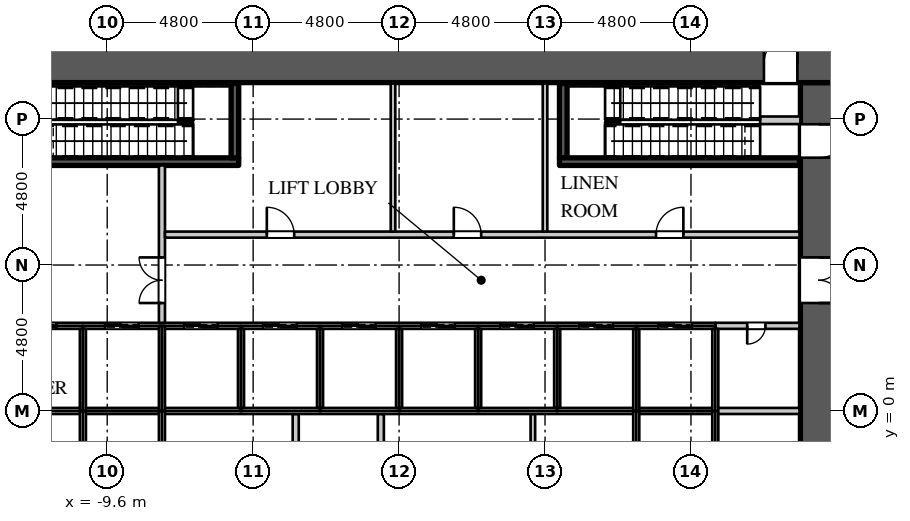
"""IFC4 building model, lengths in metres.
Left out: names, types, materials, properties, quantities, classifications, styles, units other than length and angle.
Written with IfcOpenShell. Run it as: python <this file> out.ifc"""

import sys

from ifc_helpers import new_model, si_unit, direction, frame, frame_2d, origin, place, context, subcontext, project, spatial, rectangle, extrude, element, fill, save


model = new_model("IFC4")
c1 = context("Model", 3, precision=1e-05, world=origin(), true_north=direction((0.0, 1.0)))
c2 = subcontext(c1, "Body", "Model", "MODEL_VIEW")
j1 = project(units=[si_unit("LENGTHUNIT", "METRE"), si_unit("PLANEANGLEUNIT", "RADIAN")], contexts=[c1])
p1 = place(None, origin())
s1 = spatial("IfcSite", under=j1, at=p1, CompositionType="ELEMENT")
p2 = place(p1, origin())
s2 = spatial("IfcBuilding", under=s1, at=p2, CompositionType="ELEMENT")
p3 = place(p2, origin())
s3 = spatial("IfcBuildingStorey", under=s2, at=p3, CompositionType="ELEMENT", Elevation=0.0)
p4 = place(p3, frame((-14.4, 11.4, 0.0), z_axis=(0.0, 0.0, 1.0), x_axis=(1.0, 0.0, 0.0)))
e1 = element("IfcWall", 1, at=p4, inside=s3, PredefinedType="SHEAR", context=c2, shape_type="SweptSolid", body=[
    extrude(rectangle(XDim=28.8, YDim=1.2, at=frame_2d((14.4, 0.0))), origin(), (0.0, 0.0, 1.0), 6.0),
])
p5 = place(p4, frame((1.3, 0.0, 0.0)))
e2 = element("IfcOpeningElement", 2, at=p5, cuts=e1, PredefinedType="OPENING", context=c2, shape_type="SweptSolid", body=[
    extrude(rectangle(XDim=1.1, YDim=2.2, at=frame_2d((0.55, 1.1))), frame((0.0, 0.61, 0.0), z_axis=(0.0, -1.0, 0.0), x_axis=(1.0, 0.0, 0.0)), (0.0, 0.0, 1.0), 1.22),
])
p6 = place(p4, frame((26.4, 0.0, 0.0)))
e3 = element("IfcOpeningElement", 3, at=p6, cuts=e1, PredefinedType="OPENING", context=c2, shape_type="SweptSolid", body=[
    extrude(rectangle(XDim=1.1, YDim=2.2, at=frame_2d((0.55, 1.1))), frame((0.0, 0.61, 0.0), z_axis=(0.0, -1.0, 0.0), x_axis=(1.0, 0.0, 0.0)), (0.0, 0.0, 1.0), 1.22),
])
p7 = place(p3, frame((13.8, -10.8, 0.0), z_axis=(0.0, 0.0, 1.0), x_axis=(0.0, 1.0, 0.0)))
e4 = element("IfcWall", 4, at=p7, inside=s3, PredefinedType="SHEAR", context=c2, shape_type="SweptSolid", body=[
    extrude(rectangle(XDim=21.6, YDim=1.2, at=frame_2d((10.8, 0.0))), origin(), (0.0, 0.0, 1.0), 6.0),
])
p8 = place(p7, frame((14.35, 0.0, 0.0)))
e5 = element("IfcOpeningElement", 5, at=p8, cuts=e4, PredefinedType="OPENING", context=c2, shape_type="SweptSolid", body=[
    extrude(rectangle(XDim=1.5, YDim=2.4, at=frame_2d((0.75, 1.2))), frame((0.0, 0.61, 0.0), z_axis=(0.0, -1.0, 0.0), x_axis=(1.0, 0.0, 0.0)), (0.0, 0.0, 1.0), 1.22),
])
p9 = place(p7, frame((5.75, 0.0, 0.0)))
e6 = element("IfcOpeningElement", 6, at=p9, cuts=e4, PredefinedType="OPENING", context=c2, shape_type="SweptSolid", body=[
    extrude(rectangle(XDim=1.5, YDim=2.4, at=frame_2d((0.75, 1.2))), frame((0.0, 0.61, 0.0), z_axis=(0.0, -1.0, 0.0), x_axis=(1.0, 0.0, 0.0)), (0.0, 0.0, 1.0), 1.22),
])
p10 = place(p7, frame((19.13, 0.0, 0.0)))
e7 = element("IfcOpeningElement", 7, at=p10, cuts=e4, PredefinedType="OPENING", context=c2, shape_type="SweptSolid", body=[
    extrude(rectangle(XDim=1.1, YDim=2.2, at=frame_2d((0.55, 1.1))), frame((0.0, 0.61, 0.0), z_axis=(0.0, -1.0, 0.0), x_axis=(1.0, 0.0, 0.0)), (0.0, 0.0, 1.0), 1.22),
])
p11 = place(p7, frame((1.37, 0.0, 0.0)))
e8 = element("IfcOpeningElement", 8, at=p11, cuts=e4, PredefinedType="OPENING", context=c2, shape_type="SweptSolid", body=[
    extrude(rectangle(XDim=1.1, YDim=2.2, at=frame_2d((0.55, 1.1))), frame((0.0, 0.61, 0.0), z_axis=(0.0, -1.0, 0.0), x_axis=(1.0, 0.0, 0.0)), (0.0, 0.0, 1.0), 1.22),
])
p12 = place(p3, frame((-7.8, 2.8, 0.0), z_axis=(0.0, 0.0, 1.0), x_axis=(0.0, 1.0, 0.0)))
e9 = element("IfcWall", 9, at=p12, inside=s3, PredefinedType="PARTITIONING", context=c2, shape_type="SweptSolid", body=[
    extrude(rectangle(XDim=5.275, YDim=0.2, at=frame_2d((2.637, 0.0))), origin(), (0.0, 0.0, 1.0), 5.65),
])
p13 = place(p12, frame((0.75, 0.0, 0.0)))
e10 = element("IfcOpeningElement", 10, at=p13, cuts=e9, PredefinedType="OPENING", context=c2, shape_type="SweptSolid", body=[
    extrude(rectangle(XDim=1.5, YDim=2.4, at=frame_2d((0.75, 1.2))), frame((0.0, 0.11, 0.0), z_axis=(0.0, -1.0, 0.0), x_axis=(1.0, 0.0, 0.0)), (0.0, 0.0, 1.0), 0.22),
])
p14 = place(p3, frame((-7.7, 5.8, 0.0), z_axis=(0.0, 0.0, 1.0), x_axis=(1.0, 0.0, 0.0)))
e11 = element("IfcWall", 11, at=p14, inside=s3, PredefinedType="PARTITIONING", context=c2, shape_type="SweptSolid", body=[
    extrude(rectangle(XDim=20.87, YDim=0.2, at=frame_2d((10.435, 0.0))), origin(), (0.0, 0.0, 1.0), 5.65),
])
p15 = place(p14, frame((3.35, 0.0, 0.0)))
e12 = element("IfcOpeningElement", 12, at=p15, cuts=e11, PredefinedType="OPENING", context=c2, shape_type="SweptSolid", body=[
    extrude(rectangle(XDim=0.9, YDim=2.2, at=frame_2d((0.45, 1.1))), frame((0.0, 0.11, 0.0), z_axis=(0.0, -1.0, 0.0), x_axis=(1.0, 0.0, 0.0)), (0.0, 0.0, 1.0), 0.22),
])
p16 = place(p14, frame((9.5, 0.0, 0.0)))
e13 = element("IfcOpeningElement", 13, at=p16, cuts=e11, PredefinedType="OPENING", context=c2, shape_type="SweptSolid", body=[
    extrude(rectangle(XDim=0.9, YDim=2.2, at=frame_2d((0.45, 1.1))), frame((0.0, 0.11, 0.0), z_axis=(0.0, -1.0, 0.0), x_axis=(1.0, 0.0, 0.0)), (0.0, 0.0, 1.0), 0.22),
])
p17 = place(p14, frame((16.15, 0.0, 0.0)))
e14 = element("IfcOpeningElement", 14, at=p17, cuts=e11, PredefinedType="OPENING", context=c2, shape_type="SweptSolid", body=[
    extrude(rectangle(XDim=0.9, YDim=2.2, at=frame_2d((0.45, 1.1))), frame((0.0, 0.11, 0.0), z_axis=(0.0, -1.0, 0.0), x_axis=(1.0, 0.0, 0.0)), (0.0, 0.0, 1.0), 0.22),
])
p18 = place(p3, frame((-0.2, 5.9, 0.0), z_axis=(0.0, 0.0, 1.0), x_axis=(0.0, 1.0, 0.0)))
e15 = element("IfcWall", 15, at=p18, inside=s3, PredefinedType="PARTITIONING", context=c2, shape_type="SweptSolid", body=[
    extrude(rectangle(XDim=4.87, YDim=0.15, at=frame_2d((2.435, 0.0))), origin(), (0.0, 0.0, 1.0), 5.65),
])
p19 = place(p3, frame((4.4, -2.7, 0.0), z_axis=(0.0, 0.0, 1.0), x_axis=(0.0, 1.0, 0.0)))
e16 = element("IfcWall", 16, at=p19, inside=s3, PredefinedType="PARTITIONING", context=c2, shape_type="SweptSolid", body=[
    extrude(rectangle(XDim=2.6, YDim=0.15, at=frame_2d((1.3, 0.0))), origin(), (0.0, 0.0, 1.0), 5.65),
])
p20 = place(p3, frame((4.8, 5.9, 0.0), z_axis=(0.0, 0.0, 1.0), x_axis=(0.0, 1.0, 0.0)))
e17 = element("IfcWall", 17, at=p20, inside=s3, PredefinedType="PARTITIONING", context=c2, shape_type="SweptSolid", body=[
    extrude(rectangle(XDim=4.87, YDim=0.15, at=frame_2d((2.435, 0.0))), origin(), (0.0, 0.0, 1.0), 5.65),
])
for number, where, z_axis, x_axis in (
    (18, (-3.4, -2.7, 0.0), (0.0, 0.0, 1.0), (0.0, 1.0, 0.0)),
    (19, (-0.6, -2.7, 0.0), (0.0, 0.0, 1.0), (0.0, 1.0, 0.0)),
):
    element("IfcWall", number, at=place(p3, frame(where, z_axis=z_axis, x_axis=x_axis)), inside=s3, PredefinedType="PARTITIONING", context=c2, shape_type="SweptSolid", body=[
        extrude(rectangle(XDim=2.6, YDim=0.2, at=frame_2d((1.3, 0.0))), origin(), (0.0, 0.0, 1.0), 5.65),
    ])
p21 = place(p3, frame((10.4, 2.8, 0.0), z_axis=(0.0, 0.0, 1.0), x_axis=(1.0, 0.0, 0.0)))
e20 = element("IfcWall", 20, at=p21, inside=s3, PredefinedType="PARTITIONING", context=c2, shape_type="SweptSolid", body=[
    extrude(rectangle(XDim=2.77, YDim=0.2, at=frame_2d((1.385, 0.0))), origin(), (0.0, 0.0, 1.0), 5.65),
])
p22 = place(p21, frame((1.05, 0.0, 0.0)))
e21 = element("IfcOpeningElement", 21, at=p22, cuts=e20, PredefinedType="OPENING", context=c2, shape_type="SweptSolid", body=[
    extrude(rectangle(XDim=0.6, YDim=2.0, at=frame_2d((0.3, 1.0))), frame((0.0, 0.11, 0.0), z_axis=(0.0, -1.0, 0.0), x_axis=(1.0, 0.0, 0.0)), (0.0, 0.0, 1.0), 0.22),
])
p23 = place(p3, frame((10.4, 0.0, 0.0), z_axis=(0.0, 0.0, 1.0), x_axis=(1.0, 0.0, 0.0)))
e22 = element("IfcWall", 22, at=p23, inside=s3, PredefinedType="PARTITIONING", context=c2, shape_type="SweptSolid", body=[
    extrude(rectangle(XDim=2.77, YDim=0.2, at=frame_2d((1.385, 0.0))), origin(), (0.0, 0.0, 1.0), 5.65),
])
p24 = place(p3, frame((-13.17, 0.0, 0.0), z_axis=(0.0, 0.0, 1.0), x_axis=(1.0, 0.0, 0.0)))
e23 = element("IfcWall", 23, at=p24, inside=s3, PredefinedType="PARTITIONING", context=c2, shape_type="SweptSolid", body=[
    extrude(rectangle(XDim=23.57, YDim=0.2, at=frame_2d((11.785, 0.0))), origin(), (0.0, 0.0, 1.0), 5.65),
])
p25 = place(p3, frame((-13.17, 2.8, 0.0), z_axis=(0.0, 0.0, 1.0), x_axis=(1.0, 0.0, 0.0)))
e24 = element("IfcWall", 24, at=p25, inside=s3, PredefinedType="PARTITIONING", context=c2, shape_type="SweptSolid", body=[
    extrude(rectangle(XDim=23.57, YDim=0.2, at=frame_2d((11.785, 0.0))), origin(), (0.0, 0.0, 1.0), 5.65),
])
p26 = place(p25, frame((0.8, 0.0, 0.0)))
e25 = element("IfcOpeningElement", 25, at=p26, cuts=e24, PredefinedType="OPENING", context=c2, shape_type="SweptSolid", body=[
    extrude(rectangle(XDim=1.1, YDim=2.2, at=frame_2d((0.55, 1.1))), frame((0.0, 0.11, 0.0), z_axis=(0.0, -1.0, 0.0), x_axis=(1.0, 0.0, 0.0)), (0.0, 0.0, 1.0), 0.22),
])
p27 = place(p25, frame((3.5, 0.0, 0.0)))
e26 = element("IfcOpeningElement", 26, at=p27, cuts=e24, PredefinedType="OPENING", context=c2, shape_type="SweptSolid", body=[
    extrude(rectangle(XDim=1.1, YDim=2.2, at=frame_2d((0.55, 1.1))), frame((0.0, 0.11, 0.0), z_axis=(0.0, -1.0, 0.0), x_axis=(1.0, 0.0, 0.0)), (0.0, 0.0, 1.0), 0.22),
])
p28 = place(p25, frame((6.1, 0.0, 0.0)))
e27 = element("IfcOpeningElement", 27, at=p28, cuts=e24, PredefinedType="OPENING", context=c2, shape_type="SweptSolid", body=[
    extrude(rectangle(XDim=1.1, YDim=2.2, at=frame_2d((0.55, 1.1))), frame((0.0, 0.11, 0.0), z_axis=(0.0, -1.0, 0.0), x_axis=(1.0, 0.0, 0.0)), (0.0, 0.0, 1.0), 0.22),
])
p29 = place(p25, frame((8.7, 0.0, 0.0)))
e28 = element("IfcOpeningElement", 28, at=p29, cuts=e24, PredefinedType="OPENING", context=c2, shape_type="SweptSolid", body=[
    extrude(rectangle(XDim=1.1, YDim=2.2, at=frame_2d((0.55, 1.1))), frame((0.0, 0.11, 0.0), z_axis=(0.0, -1.0, 0.0), x_axis=(1.0, 0.0, 0.0)), (0.0, 0.0, 1.0), 0.22),
])
p30 = place(p25, frame((11.3, 0.0, 0.0)))
e29 = element("IfcOpeningElement", 29, at=p30, cuts=e24, PredefinedType="OPENING", context=c2, shape_type="SweptSolid", body=[
    extrude(rectangle(XDim=1.1, YDim=2.2, at=frame_2d((0.55, 1.1))), frame((0.0, 0.11, 0.0), z_axis=(0.0, -1.0, 0.0), x_axis=(1.0, 0.0, 0.0)), (0.0, 0.0, 1.0), 0.22),
])
p31 = place(p25, frame((13.9, 0.0, 0.0)))
e30 = element("IfcOpeningElement", 30, at=p31, cuts=e24, PredefinedType="OPENING", context=c2, shape_type="SweptSolid", body=[
    extrude(rectangle(XDim=1.1, YDim=2.2, at=frame_2d((0.55, 1.1))), frame((0.0, 0.11, 0.0), z_axis=(0.0, -1.0, 0.0), x_axis=(1.0, 0.0, 0.0)), (0.0, 0.0, 1.0), 0.22),
])
p32 = place(p25, frame((16.5, 0.0, 0.0)))
e31 = element("IfcOpeningElement", 31, at=p32, cuts=e24, PredefinedType="OPENING", context=c2, shape_type="SweptSolid", body=[
    extrude(rectangle(XDim=1.1, YDim=2.2, at=frame_2d((0.55, 1.1))), frame((0.0, 0.11, 0.0), z_axis=(0.0, -1.0, 0.0), x_axis=(1.0, 0.0, 0.0)), (0.0, 0.0, 1.0), 0.22),
])
p33 = place(p25, frame((19.1, 0.0, 0.0)))
e32 = element("IfcOpeningElement", 32, at=p33, cuts=e24, PredefinedType="OPENING", context=c2, shape_type="SweptSolid", body=[
    extrude(rectangle(XDim=1.1, YDim=2.2, at=frame_2d((0.55, 1.1))), frame((0.0, 0.11, 0.0), z_axis=(0.0, -1.0, 0.0), x_axis=(1.0, 0.0, 0.0)), (0.0, 0.0, 1.0), 0.22),
])
p34 = place(p25, frame((21.7, 0.0, 0.0)))
e33 = element("IfcOpeningElement", 33, at=p34, cuts=e24, PredefinedType="OPENING", context=c2, shape_type="SweptSolid", body=[
    extrude(rectangle(XDim=1.1, YDim=2.2, at=frame_2d((0.55, 1.1))), frame((0.0, 0.11, 0.0), z_axis=(0.0, -1.0, 0.0), x_axis=(1.0, 0.0, 0.0)), (0.0, 0.0, 1.0), 0.22),
])
for number, where, z_axis, x_axis in (
    (34, (-10.4, -2.7, 0.0), (0.0, 0.0, 1.0), (0.0, 1.0, 0.0)),
    (35, (-10.4, 0.0, 0.0), (0.0, 0.0, 1.0), (0.0, 1.0, 0.0)),
):
    element("IfcWall", number, at=place(p3, frame(where, z_axis=z_axis, x_axis=x_axis)), inside=s3, PredefinedType="PARTITIONING", context=c2, shape_type="SweptSolid", body=[
        extrude(rectangle(XDim=2.7, YDim=0.2, at=frame_2d((1.35, 0.0))), origin(), (0.0, 0.0, 1.0), 5.65),
    ])
for number, where, z_axis, x_axis in (
    (36, (-7.8, -2.8, 0.0), (0.0, 0.0, 1.0), (0.0, 1.0, 0.0)),
    (37, (-7.8, 0.0, 0.0), (0.0, 0.0, 1.0), (0.0, 1.0, 0.0)),
):
    element("IfcWall", number, at=place(p3, frame(where, z_axis=z_axis, x_axis=x_axis)), inside=s3, PredefinedType="PARTITIONING", context=c2, shape_type="SweptSolid", body=[
        extrude(rectangle(XDim=2.8, YDim=0.2, at=frame_2d((1.4, 0.0))), origin(), (0.0, 0.0, 1.0), 5.65),
    ])
for number, where, z_axis, x_axis in (
    (38, (-5.2, 0.1, 0.0), (0.0, 0.0, 1.0), (0.0, 1.0, 0.0)),
    (39, (-2.6, 0.1, 0.0), (0.0, 0.0, 1.0), (0.0, 1.0, 0.0)),
    (40, (0.0, 0.1, 0.0), (0.0, 0.0, 1.0), (0.0, 1.0, 0.0)),
    (41, (2.6, 0.1, 0.0), (0.0, 0.0, 1.0), (0.0, 1.0, 0.0)),
    (42, (5.2, 0.1, 0.0), (0.0, 0.0, 1.0), (0.0, 1.0, 0.0)),
):
    element("IfcWall", number, at=place(p3, frame(where, z_axis=z_axis, x_axis=x_axis)), inside=s3, PredefinedType="PARTITIONING", context=c2, shape_type="SweptSolid", body=[
        extrude(rectangle(XDim=2.6, YDim=0.2, at=frame_2d((1.3, 0.0))), origin(), (0.0, 0.0, 1.0), 5.65),
    ])
for number, where, z_axis, x_axis in (
    (43, (7.8, -2.7, 0.0), (0.0, 0.0, 1.0), (0.0, 1.0, 0.0)),
    (44, (7.8, 0.0, 0.0), (0.0, 0.0, 1.0), (0.0, 1.0, 0.0)),
):
    element("IfcWall", number, at=place(p3, frame(where, z_axis=z_axis, x_axis=x_axis)), inside=s3, PredefinedType="PARTITIONING", context=c2, shape_type="SweptSolid", body=[
        extrude(rectangle(XDim=2.7, YDim=0.2, at=frame_2d((1.35, 0.0))), origin(), (0.0, 0.0, 1.0), 5.65),
    ])
p35 = place(p3, frame((10.4, -2.7, 0.0), z_axis=(0.0, 0.0, 1.0), x_axis=(0.0, 1.0, 0.0)))
e45 = element("IfcWall", 45, at=p35, inside=s3, PredefinedType="PARTITIONING", context=c2, shape_type="SweptSolid", body=[
    extrude(rectangle(XDim=5.4, YDim=0.2, at=frame_2d((2.7, 0.0))), origin(), (0.0, 0.0, 1.0), 5.65),
])
p36 = place(p3, frame((-13.17, 8.2, 0.0), z_axis=(0.0, 0.0, 1.0), x_axis=(1.0, 0.0, 0.0)))
e46 = element("IfcWall", 46, at=p36, inside=s3, PredefinedType="SHEAR", context=c2, shape_type="SweptSolid", body=[
    extrude(rectangle(XDim=7.895, YDim=0.25, at=frame_2d((3.948, 0.0))), origin(), (0.0, 0.0, 1.0), 5.65),
])
p37 = place(p36, frame((0.15, 0.0, 0.0)))
e47 = element("IfcOpeningElement", 47, at=p37, cuts=e46, PredefinedType="OPENING", context=c2, shape_type="SweptSolid", body=[
    extrude(rectangle(XDim=1.1, YDim=2.2, at=frame_2d((0.55, 1.1))), frame((0.0, 0.135, 0.0), z_axis=(0.0, -1.0, 0.0), x_axis=(1.0, 0.0, 0.0)), (0.0, 0.0, 1.0), 0.27),
])
for number, where, z_axis, x_axis in (
    (48, (-5.4, 8.325, 0.0), (0.0, 0.0, 1.0), (0.0, 1.0, 0.0)),
    (49, (5.4, 8.325, 0.0), (0.0, 0.0, 1.0), (0.0, 1.0, 0.0)),
):
    element("IfcWall", number, at=place(p3, frame(where, z_axis=z_axis, x_axis=x_axis)), inside=s3, PredefinedType="SHEAR", context=c2, shape_type="SweptSolid", body=[
        extrude(rectangle(XDim=2.445, YDim=0.25, at=frame_2d((1.223, 0.0))), origin(), (0.0, 0.0, 1.0), 5.65),
    ])
p38 = place(p3, frame((5.275, 8.2, 0.0), z_axis=(0.0, 0.0, 1.0), x_axis=(1.0, 0.0, 0.0)))
e50 = element("IfcWall", 50, at=p38, inside=s3, PredefinedType="SHEAR", context=c2, shape_type="SweptSolid", body=[
    extrude(rectangle(XDim=7.895, YDim=0.25, at=frame_2d((3.948, 0.0))), origin(), (0.0, 0.0, 1.0), 5.65),
])
p39 = place(p3, frame((13.2, 9.56, 0.0), z_axis=(0.0, 0.0, 1.0), x_axis=(-1.0, 0.0, 0.0)))
e51 = element("IfcWall", 51, at=p39, inside=s3, PredefinedType="PARTITIONING", context=c2, shape_type="SweptSolid", body=[
    extrude(rectangle(XDim=1.325, YDim=0.25, at=frame_2d((0.663, 0.0))), origin(), (0.0, 0.0, 1.0), 5.65),
])
p40 = place(p22, origin())
e52 = element("IfcDoor", 52, at=p40, inside=s3, OperationType="SINGLE_SWING_RIGHT", PredefinedType="DOOR", context=c2, shape_type="SweptSolid", body=[
    extrude(rectangle(XDim=0.6, YDim=2.0, at=frame_2d((0.3, 1.0))), frame((0.0, 0.025, 0.0), z_axis=(0.0, -1.0, 0.0), x_axis=(1.0, 0.0, 0.0)), (0.0, 0.0, 1.0), 0.05),
])
fill(e21, e52)
p41 = place(p15, origin())
e53 = element("IfcDoor", 53, at=p41, inside=s3, OperationType="SINGLE_SWING_LEFT", PredefinedType="DOOR", context=c2, shape_type="SweptSolid", body=[
    extrude(rectangle(XDim=0.9, YDim=2.2, at=frame_2d((0.45, 1.1))), frame((0.0, 0.025, 0.0), z_axis=(0.0, -1.0, 0.0), x_axis=(1.0, 0.0, 0.0)), (0.0, 0.0, 1.0), 0.05),
])
fill(e12, e53)
p42 = place(p16, origin())
e54 = element("IfcDoor", 54, at=p42, inside=s3, OperationType="SINGLE_SWING_LEFT", PredefinedType="DOOR", context=c2, shape_type="SweptSolid", body=[
    extrude(rectangle(XDim=0.9, YDim=2.2, at=frame_2d((0.45, 1.1))), frame((0.0, 0.025, 0.0), z_axis=(0.0, -1.0, 0.0), x_axis=(1.0, 0.0, 0.0)), (0.0, 0.0, 1.0), 0.05),
])
fill(e13, e54)
p43 = place(p17, origin())
e55 = element("IfcDoor", 55, at=p43, inside=s3, OperationType="SINGLE_SWING_RIGHT", PredefinedType="DOOR", context=c2, shape_type="SweptSolid", body=[
    extrude(rectangle(XDim=0.9, YDim=2.2, at=frame_2d((0.45, 1.1))), frame((0.0, 0.025, 0.0), z_axis=(0.0, -1.0, 0.0), x_axis=(1.0, 0.0, 0.0)), (0.0, 0.0, 1.0), 0.05),
])
fill(e14, e55)
p44 = place(p26, origin())
e56 = element("IfcDoor", 56, at=p44, inside=s3, OperationType="DOUBLE_DOOR_SLIDING", PredefinedType="DOOR", context=c2, shape_type="SweptSolid", body=[
    extrude(rectangle(XDim=1.1, YDim=2.2, at=frame_2d((0.55, 1.1))), frame((0.0, 0.025, 0.0), z_axis=(0.0, -1.0, 0.0), x_axis=(1.0, 0.0, 0.0)), (0.0, 0.0, 1.0), 0.05),
])
fill(e25, e56)
p45 = place(p27, origin())
e57 = element("IfcDoor", 57, at=p45, inside=s3, OperationType="DOUBLE_DOOR_SLIDING", PredefinedType="DOOR", context=c2, shape_type="SweptSolid", body=[
    extrude(rectangle(XDim=1.1, YDim=2.2, at=frame_2d((0.55, 1.1))), frame((0.0, 0.025, 0.0), z_axis=(0.0, -1.0, 0.0), x_axis=(1.0, 0.0, 0.0)), (0.0, 0.0, 1.0), 0.05),
])
fill(e26, e57)
p46 = place(p28, origin())
e58 = element("IfcDoor", 58, at=p46, inside=s3, OperationType="DOUBLE_DOOR_SLIDING", PredefinedType="DOOR", context=c2, shape_type="SweptSolid", body=[
    extrude(rectangle(XDim=1.1, YDim=2.2, at=frame_2d((0.55, 1.1))), frame((0.0, 0.025, 0.0), z_axis=(0.0, -1.0, 0.0), x_axis=(1.0, 0.0, 0.0)), (0.0, 0.0, 1.0), 0.05),
])
fill(e27, e58)
p47 = place(p29, origin())
e59 = element("IfcDoor", 59, at=p47, inside=s3, OperationType="DOUBLE_DOOR_SLIDING", PredefinedType="DOOR", context=c2, shape_type="SweptSolid", body=[
    extrude(rectangle(XDim=1.1, YDim=2.2, at=frame_2d((0.55, 1.1))), frame((0.0, 0.025, 0.0), z_axis=(0.0, -1.0, 0.0), x_axis=(1.0, 0.0, 0.0)), (0.0, 0.0, 1.0), 0.05),
])
fill(e28, e59)
p48 = place(p30, origin())
e60 = element("IfcDoor", 60, at=p48, inside=s3, OperationType="DOUBLE_DOOR_SLIDING", PredefinedType="DOOR", context=c2, shape_type="SweptSolid", body=[
    extrude(rectangle(XDim=1.1, YDim=2.2, at=frame_2d((0.55, 1.1))), frame((0.0, 0.025, 0.0), z_axis=(0.0, -1.0, 0.0), x_axis=(1.0, 0.0, 0.0)), (0.0, 0.0, 1.0), 0.05),
])
fill(e29, e60)
p49 = place(p31, origin())
e61 = element("IfcDoor", 61, at=p49, inside=s3, OperationType="DOUBLE_DOOR_SLIDING", PredefinedType="DOOR", context=c2, shape_type="SweptSolid", body=[
    extrude(rectangle(XDim=1.1, YDim=2.2, at=frame_2d((0.55, 1.1))), frame((0.0, 0.025, 0.0), z_axis=(0.0, -1.0, 0.0), x_axis=(1.0, 0.0, 0.0)), (0.0, 0.0, 1.0), 0.05),
])
fill(e30, e61)
p50 = place(p32, origin())
e62 = element("IfcDoor", 62, at=p50, inside=s3, OperationType="DOUBLE_DOOR_SLIDING", PredefinedType="DOOR", context=c2, shape_type="SweptSolid", body=[
    extrude(rectangle(XDim=1.1, YDim=2.2, at=frame_2d((0.55, 1.1))), frame((0.0, 0.025, 0.0), z_axis=(0.0, -1.0, 0.0), x_axis=(1.0, 0.0, 0.0)), (0.0, 0.0, 1.0), 0.05),
])
fill(e31, e62)
p51 = place(p33, origin())
e63 = element("IfcDoor", 63, at=p51, inside=s3, OperationType="DOUBLE_DOOR_SLIDING", PredefinedType="DOOR", context=c2, shape_type="SweptSolid", body=[
    extrude(rectangle(XDim=1.1, YDim=2.2, at=frame_2d((0.55, 1.1))), frame((0.0, 0.025, 0.0), z_axis=(0.0, -1.0, 0.0), x_axis=(1.0, 0.0, 0.0)), (0.0, 0.0, 1.0), 0.05),
])
fill(e32, e63)
p52 = place(p34, origin())
e64 = element("IfcDoor", 64, at=p52, inside=s3, OperationType="DOUBLE_DOOR_SLIDING", PredefinedType="DOOR", context=c2, shape_type="SweptSolid", body=[
    extrude(rectangle(XDim=1.1, YDim=2.2, at=frame_2d((0.55, 1.1))), frame((0.0, 0.025, 0.0), z_axis=(0.0, -1.0, 0.0), x_axis=(1.0, 0.0, 0.0)), (0.0, 0.0, 1.0), 0.05),
])
fill(e33, e64)
p53 = place(p13, origin())
e65 = element("IfcDoor", 65, at=p53, inside=s3, OperationType="DOUBLE_DOOR_SINGLE_SWING", PredefinedType="DOOR", context=c2, shape_type="SweptSolid", body=[
    extrude(rectangle(XDim=1.5, YDim=2.4, at=frame_2d((0.75, 1.2))), frame((0.0, 0.025, 0.0), z_axis=(0.0, -1.0, 0.0), x_axis=(1.0, 0.0, 0.0)), (0.0, 0.0, 1.0), 0.05),
])
fill(e10, e65)
p54 = place(p8, origin())
e66 = element("IfcDoor", 66, at=p54, inside=s3, OperationType="DOUBLE_DOOR_SINGLE_SWING", PredefinedType="DOOR", context=c2, shape_type="SweptSolid", body=[
    extrude(rectangle(XDim=1.5, YDim=2.4, at=frame_2d((0.75, 1.2))), frame((0.0, 0.025, 0.0), z_axis=(0.0, -1.0, 0.0), x_axis=(1.0, 0.0, 0.0)), (0.0, 0.0, 1.0), 0.05),
])
fill(e5, e66)
p55 = place(p6, origin())
e67 = element("IfcDoor", 67, at=p55, inside=s3, OperationType="SINGLE_SWING_RIGHT", PredefinedType="DOOR", context=c2, shape_type="SweptSolid", body=[
    extrude(rectangle(XDim=1.1, YDim=2.2, at=frame_2d((0.55, 1.1))), frame((0.0, 0.025, 0.0), z_axis=(0.0, -1.0, 0.0), x_axis=(1.0, 0.0, 0.0)), (0.0, 0.0, 1.0), 0.05),
])
fill(e3, e67)
p56 = place(p10, origin())
e68 = element("IfcDoor", 68, at=p56, inside=s3, OperationType="SINGLE_SWING_LEFT", PredefinedType="DOOR", context=c2, shape_type="SweptSolid", body=[
    extrude(rectangle(XDim=1.1, YDim=2.2, at=frame_2d((0.55, 1.1))), frame((0.0, 0.025, 0.0), z_axis=(0.0, -1.0, 0.0), x_axis=(1.0, 0.0, 0.0)), (0.0, 0.0, 1.0), 0.05),
])
fill(e7, e68)
save(model, sys.argv[1])
